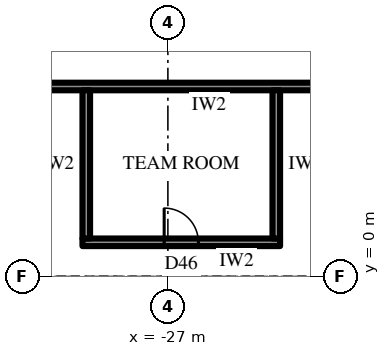
"""IFC4 building model, lengths in metres.
Left out: names, types, materials, properties, quantities, classifications, styles, units other than length and angle.
Written with IfcOpenShell. Run it as: python <this file> out.ifc"""

import sys

from ifc_helpers import new_model, si_unit, direction, frame, frame_2d, origin, place, context, subcontext, project, spatial, rectangle, extrude, element, fill, save


model = new_model("IFC4")
c1 = context("Model", 3, precision=1e-05, world=origin(), true_north=direction((0.0, 1.0)))
c2 = subcontext(c1, "Body", "Model", "MODEL_VIEW")
j1 = project(units=[si_unit("LENGTHUNIT", "METRE"), si_unit("PLANEANGLEUNIT", "RADIAN")], contexts=[c1])
p1 = place(None, origin())
s1 = spatial("IfcSite", under=j1, at=p1, CompositionType="ELEMENT")
p2 = place(p1, origin())
s2 = spatial("IfcBuilding", under=s1, at=p2, CompositionType="ELEMENT")
p3 = place(p2, frame((0.0, 0.0, 190.9)))
s3 = spatial("IfcBuildingStorey", under=s2, at=p3, CompositionType="ELEMENT", Elevation=190.9)
p4 = place(p3, frame((-18.6, 5.0, 0.0), z_axis=(0.0, 0.0, 1.0), x_axis=(-1.0, 0.0, 0.0)))
e1 = element("IfcWall", 1, at=p4, inside=s3, PredefinedType="PARTITIONING", context=c2, shape_type="SweptSolid", body=[
    extrude(rectangle(XDim=14.632, YDim=0.2, at=frame_2d((7.316, 0.0))), origin(), (0.0, 0.0, 1.0), 4.0),
])
p5 = place(p4, frame((0.963, 0.0, 0.0)))
e2 = element("IfcOpeningElement", 2, at=p5, cuts=e1, PredefinedType="OPENING", context=c2, shape_type="SweptSolid", body=[
    extrude(rectangle(XDim=1.0, YDim=2.2, at=frame_2d((0.5, 1.1))), frame((0.0, 0.11, 0.0), z_axis=(0.0, -1.0, 0.0), x_axis=(1.0, 0.0, 0.0)), (0.0, 0.0, 1.0), 0.22),
])
p6 = place(p3, frame((-24.048, 0.9, 0.0), z_axis=(0.0, 0.0, 1.0), x_axis=(-1.0, 0.0, 0.0)))
e3 = element("IfcWall", 3, at=p6, inside=s3, PredefinedType="PARTITIONING", context=c2, shape_type="SweptSolid", body=[
    extrude(rectangle(XDim=5.2, YDim=0.2, at=frame_2d((2.6, 0.0))), origin(), (0.0, 0.0, 1.0), 4.0),
])
p7 = place(p6, frame((2.15, 0.0, 0.0)))
e4 = element("IfcOpeningElement", 4, at=p7, cuts=e3, PredefinedType="OPENING", context=c2, shape_type="SweptSolid", body=[
    extrude(rectangle(XDim=0.9, YDim=2.2, at=frame_2d((0.45, 1.1))), frame((0.0, 0.11, 0.0), z_axis=(0.0, -1.0, 0.0), x_axis=(1.0, 0.0, 0.0)), (0.0, 0.0, 1.0), 0.22),
])
for number, where, z_axis, x_axis in (
    (5, (-24.148, 4.9, 0.0), (0.0, 0.0, 1.0), (0.0, -1.0, 0.0)),
    (6, (-29.148, 4.9, 0.0), (0.0, 0.0, 1.0), (0.0, -1.0, 0.0)),
):
    element("IfcWall", number, at=place(p3, frame(where, z_axis=z_axis, x_axis=x_axis)), inside=s3, PredefinedType="PARTITIONING", context=c2, shape_type="SweptSolid", body=[
        extrude(rectangle(XDim=3.9, YDim=0.2, at=frame_2d((1.95, 0.0))), origin(), (0.0, 0.0, 1.0), 4.0),
    ])
p8 = place(p7, frame((0.9, 0.0, 0.0), z_axis=(0.0, 0.0, 1.0), x_axis=(-1.0, 0.0, 0.0)))
e7 = element("IfcDoor", 7, at=p8, inside=s3, OperationType="SINGLE_SWING_RIGHT", PredefinedType="DOOR", context=c2, shape_type="SweptSolid", body=[
    extrude(rectangle(XDim=0.9, YDim=2.2, at=frame_2d((0.45, 1.1))), frame((0.0, 0.025, 0.0), z_axis=(0.0, -1.0, 0.0), x_axis=(1.0, 0.0, 0.0)), (0.0, 0.0, 1.0), 0.05),
])
fill(e4, e7)
save(model, sys.argv[1])
